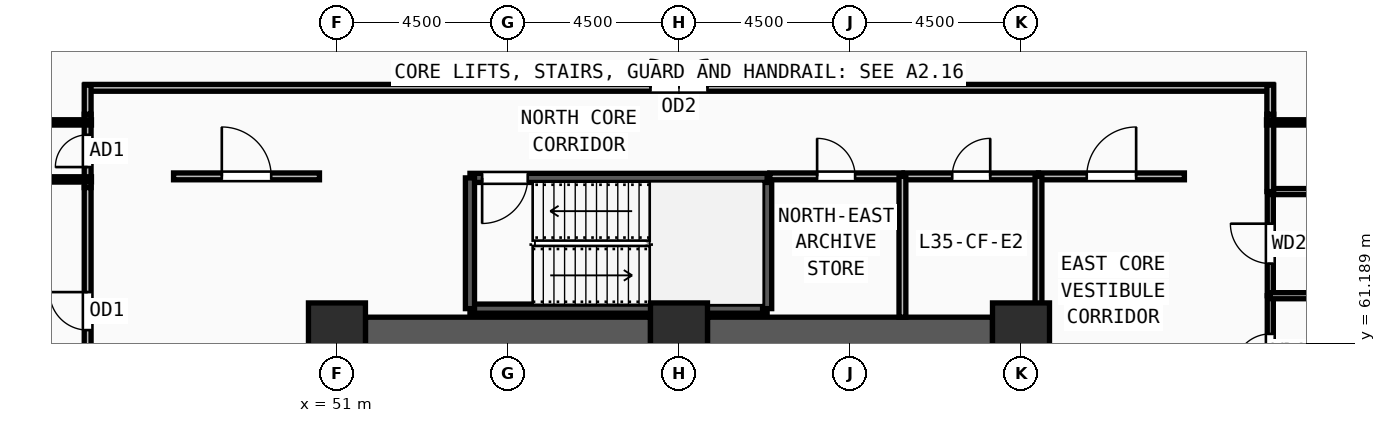
"""IFC4 building model, lengths in metres.
Left out: names, types, materials, properties, quantities, classifications, styles, units other than length and angle.
Written with IfcOpenShell. Run it as: python <this file> out.ifc"""

import sys

from ifc_helpers import new_model, si_unit, direction, frame, frame_2d, origin, origin_2d, place, context, subcontext, project, spatial, rectangle, extrude, source, transform, mapped, element, fill, save


model = new_model("IFC4")
c1 = context("Model", 3, precision=1e-05, world=origin(), true_north=direction((0.0, 1.0)))
c2 = subcontext(c1, "Body", "Model", "MODEL_VIEW")
j1 = project(units=[si_unit("LENGTHUNIT", "METRE"), si_unit("PLANEANGLEUNIT", "RADIAN")], contexts=[c1])
p1 = place(None, origin())
s1 = spatial("IfcSite", under=j1, at=p1, CompositionType="ELEMENT")
p2 = place(p1, origin())
s2 = spatial("IfcBuilding", under=s1, at=p2, CompositionType="ELEMENT")
p3 = place(p2, frame((0.0, 0.0, 135.75)))
s3 = spatial("IfcBuildingStorey", under=s2, at=p3, CompositionType="ELEMENT", Elevation=135.75)
m1 = source(origin(), c2, "Body", "SweptSolid", [
    extrude(rectangle(XDim=1.5, YDim=1.5, at=origin_2d()), origin(), (0.0, 0.0, 1.0), 3.75),
])
for number, where, z_axis, x_axis in (
    (1, (69.0, 61.5, 0.0), (0.0, 0.0, 1.0), (1.0, 0.0, 0.0)),
    (2, (60.0, 61.5, 0.0), (0.0, 0.0, 1.0), (1.0, 0.0, 0.0)),
    (3, (51.0, 61.5, 0.0), (0.0, 0.0, 1.0), (1.0, 0.0, 0.0)),
):
    element("IfcColumn", number, at=place(p3, frame(where, z_axis=z_axis, x_axis=x_axis)), inside=s3, PredefinedType="COLUMN", context=c2, shape_type="MappedRepresentation", body=[
        mapped(m1, transform((0.0, 0.0, 0.0), x_axis=(1.0, 0.0, 0.0), y_axis=(0.0, 1.0, 0.0), z_axis=(0.0, 0.0, 1.0), scale=1.0)),
    ])
for number, where, z_axis, x_axis in (
    (4, (51.75, 61.5, 0.0), (0.0, 0.0, 1.0), (1.0, 0.0, 0.0)),
    (5, (60.75, 61.5, 0.0), (0.0, 0.0, 1.0), (1.0, 0.0, 0.0)),
):
    element("IfcWall", number, at=place(p3, frame(where, z_axis=z_axis, x_axis=x_axis)), inside=s3, PredefinedType="SHEAR", context=c2, shape_type="SweptSolid", body=[
        extrude(rectangle(XDim=7.5, YDim=0.75, at=frame_2d((3.75, 0.0))), origin(), (0.0, 0.0, 1.0), 3.47),
    ])
p4 = place(p3, frame((54.5, 62.1, 0.0), z_axis=(0.0, 0.0, 1.0), x_axis=(1.0, 0.0, 0.0)))
e6 = element("IfcWall", 6, at=p4, inside=s3, PredefinedType="SOLIDWALL", context=c2, shape_type="SweptSolid", body=[
    extrude(rectangle(XDim=7.82, YDim=0.24, at=frame_2d((3.91, 0.0))), origin(), (0.0, 0.0, 1.0), 3.47),
])
p5 = place(p3, frame((62.32, 62.1, 0.0), z_axis=(0.0, 0.0, 1.0), x_axis=(0.0, 1.0, 0.0)))
e7 = element("IfcWall", 7, at=p5, inside=s3, PredefinedType="SOLIDWALL", context=c2, shape_type="SweptSolid", body=[
    extrude(rectangle(XDim=3.44, YDim=0.24, at=frame_2d((1.72, 0.0))), origin(), (0.0, 0.0, 1.0), 3.47),
])
p6 = place(p3, frame((62.32, 65.54, 0.0), z_axis=(0.0, 0.0, 1.0), x_axis=(-1.0, 0.0, 0.0)))
e8 = element("IfcWall", 8, at=p6, inside=s3, PredefinedType="SOLIDWALL", context=c2, shape_type="SweptSolid", body=[
    extrude(rectangle(XDim=7.82, YDim=0.24, at=frame_2d((3.91, 0.0))), origin(), (0.0, 0.0, 1.0), 3.47),
])
m2 = source(origin(), c2, "Body", "SweptSolid", [
    extrude(rectangle(XDim=1.2, YDim=2.2, at=frame_2d((0.6, 1.1))), frame((0.0, 0.13, 0.0), z_axis=(0.0, -1.0, 0.0), x_axis=(1.0, 0.0, 0.0)), (0.0, 0.0, 1.0), 0.26),
])
p7 = place(p6, frame((6.3, 0.0, 0.0)))
e9 = element("IfcOpeningElement", 9, at=p7, cuts=e8, PredefinedType="OPENING", context=c2, shape_type="MappedRepresentation", body=[
    mapped(m2, transform((0.0, 0.0, 0.0), x_axis=(1.0, 0.0, 0.0), y_axis=(0.0, 1.0, 0.0), z_axis=(0.0, 0.0, 1.0), scale=1.0)),
])
p8 = place(p3, frame((54.5, 65.54, 0.0), z_axis=(0.0, 0.0, 1.0), x_axis=(0.0, -1.0, 0.0)))
e10 = element("IfcWall", 10, at=p8, inside=s3, PredefinedType="SOLIDWALL", context=c2, shape_type="SweptSolid", body=[
    extrude(rectangle(XDim=3.44, YDim=0.24, at=frame_2d((1.72, 0.0))), origin(), (0.0, 0.0, 1.0), 3.47),
])
p9 = place(p3, frame((75.56, 59.48, 0.0), z_axis=(0.0, 0.0, 1.0), x_axis=(0.0, 1.0, 0.0)))
e11 = element("IfcWall", 11, at=p9, inside=s3, PredefinedType="PARTITIONING", context=c2, shape_type="SweptSolid", body=[
    extrude(rectangle(XDim=2.96, YDim=0.16, at=frame_2d((1.48, 0.0))), origin(), (0.0, 0.0, 1.0), 3.47),
])
m3 = source(origin(), c2, "Body", "SweptSolid", [
    extrude(rectangle(XDim=0.95, YDim=2.15, at=frame_2d((0.475, 1.075))), frame((0.0, 0.09, 0.0), z_axis=(0.0, -1.0, 0.0), x_axis=(1.0, 0.0, 0.0)), (0.0, 0.0, 1.0), 0.18),
])
p10 = place(p9, frame((1.005, 0.0, 0.0)))
e12 = element("IfcOpeningElement", 12, at=p10, cuts=e11, PredefinedType="OPENING", context=c2, shape_type="MappedRepresentation", body=[
    mapped(m3, transform((0.0, 0.0, 0.0), x_axis=(1.0, 0.0, 0.0), y_axis=(0.0, 1.0, 0.0), z_axis=(0.0, 0.0, 1.0), scale=1.0)),
])
p11 = place(p3, frame((75.56, 62.44, 0.0), z_axis=(0.0, 0.0, 1.0), x_axis=(0.0, 1.0, 0.0)))
e13 = element("IfcWall", 13, at=p11, inside=s3, PredefinedType="PARTITIONING", context=c2, shape_type="SweptSolid", body=[
    extrude(rectangle(XDim=2.74, YDim=0.16, at=frame_2d((1.37, 0.0))), origin(), (0.0, 0.0, 1.0), 3.47),
])
m4 = source(origin(), c2, "Body", "SweptSolid", [
    extrude(rectangle(XDim=1.05, YDim=2.15, at=frame_2d((0.525, 1.075))), frame((0.0, 0.09, 0.0), z_axis=(0.0, -1.0, 0.0), x_axis=(1.0, 0.0, 0.0)), (0.0, 0.0, 1.0), 0.18),
])
p12 = place(p11, frame((0.845, 0.0, 0.0)))
e14 = element("IfcOpeningElement", 14, at=p12, cuts=e13, PredefinedType="OPENING", context=c2, shape_type="MappedRepresentation", body=[
    mapped(m4, transform((0.0, 0.0, 0.0), x_axis=(1.0, 0.0, 0.0), y_axis=(0.0, 1.0, 0.0), z_axis=(0.0, 0.0, 1.0), scale=1.0)),
])
p13 = place(p3, frame((62.39, 65.58, 0.0), z_axis=(0.0, 0.0, 1.0), x_axis=(1.0, 0.0, 0.0)))
e15 = element("IfcWall", 15, at=p13, inside=s3, PredefinedType="PARTITIONING", context=c2, shape_type="SweptSolid", body=[
    extrude(rectangle(XDim=3.49, YDim=0.18, at=frame_2d((1.745, 0.0))), origin(), (0.0, 0.0, 1.0), 3.47),
])
m5 = source(origin(), c2, "Body", "SweptSolid", [
    extrude(rectangle(XDim=1.0, YDim=2.2, at=frame_2d((0.5, 1.1))), frame((0.0, 0.1, 0.0), z_axis=(0.0, -1.0, 0.0), x_axis=(1.0, 0.0, 0.0)), (0.0, 0.0, 1.0), 0.2),
])
p14 = place(p13, frame((1.245, 0.0, 0.0)))
e16 = element("IfcOpeningElement", 16, at=p14, cuts=e15, PredefinedType="OPENING", context=c2, shape_type="MappedRepresentation", body=[
    mapped(m5, transform((0.0, 0.0, 0.0), x_axis=(1.0, 0.0, 0.0), y_axis=(0.0, 1.0, 0.0), z_axis=(0.0, 0.0, 1.0), scale=1.0)),
])
p15 = place(p3, frame((65.92, 65.58, 0.0), z_axis=(0.0, 0.0, 1.0), x_axis=(1.0, 0.0, 0.0)))
e17 = element("IfcWall", 17, at=p15, inside=s3, PredefinedType="PARTITIONING", context=c2, shape_type="SweptSolid", body=[
    extrude(rectangle(XDim=3.54, YDim=0.18, at=frame_2d((1.77, 0.0))), origin(), (0.0, 0.0, 1.0), 3.47),
])
p16 = place(p15, frame((1.27, 0.0, 0.0)))
e18 = element("IfcOpeningElement", 18, at=p16, cuts=e17, PredefinedType="OPENING", context=c2, shape_type="MappedRepresentation", body=[
    mapped(m5, transform((0.0, 0.0, 0.0), x_axis=(1.0, 0.0, 0.0), y_axis=(0.0, 1.0, 0.0), z_axis=(0.0, 0.0, 1.0), scale=1.0)),
])
p17 = place(p3, frame((46.7, 65.58, 0.0), z_axis=(0.0, 0.0, 1.0), x_axis=(1.0, 0.0, 0.0)))
e19 = element("IfcWall", 19, at=p17, inside=s3, PredefinedType="PARTITIONING", context=c2, shape_type="SweptSolid", body=[
    extrude(rectangle(XDim=3.84, YDim=0.18, at=frame_2d((1.92, 0.0))), origin(), (0.0, 0.0, 1.0), 3.47),
])
m6 = source(origin(), c2, "Body", "SweptSolid", [
    extrude(rectangle(XDim=1.3, YDim=2.2, at=frame_2d((0.65, 1.1))), frame((0.0, 0.1, 0.0), z_axis=(0.0, -1.0, 0.0), x_axis=(1.0, 0.0, 0.0)), (0.0, 0.0, 1.0), 0.2),
])
p18 = place(p17, frame((1.27, 0.0, 0.0)))
e20 = element("IfcOpeningElement", 20, at=p18, cuts=e19, PredefinedType="OPENING", context=c2, shape_type="MappedRepresentation", body=[
    mapped(m6, transform((0.0, 0.0, 0.0), x_axis=(1.0, 0.0, 0.0), y_axis=(0.0, 1.0, 0.0), z_axis=(0.0, 0.0, 1.0), scale=1.0)),
])
p19 = place(p3, frame((69.46, 65.58, 0.0), z_axis=(0.0, 0.0, 1.0), x_axis=(1.0, 0.0, 0.0)))
e21 = element("IfcWall", 21, at=p19, inside=s3, PredefinedType="PARTITIONING", context=c2, shape_type="SweptSolid", body=[
    extrude(rectangle(XDim=3.84, YDim=0.18, at=frame_2d((1.92, 0.0))), origin(), (0.0, 0.0, 1.0), 3.47),
])
p20 = place(p19, frame((1.27, 0.0, 0.0)))
e22 = element("IfcOpeningElement", 22, at=p20, cuts=e21, PredefinedType="OPENING", context=c2, shape_type="MappedRepresentation", body=[
    mapped(m6, transform((0.0, 0.0, 0.0), x_axis=(1.0, 0.0, 0.0), y_axis=(0.0, 1.0, 0.0), z_axis=(0.0, 0.0, 1.0), scale=1.0)),
])
p21 = place(p3, frame((44.37, 67.91, 0.0), z_axis=(0.0, 0.0, 1.0), x_axis=(1.0, 0.0, 0.0)))
e23 = element("IfcWall", 23, at=p21, inside=s3, PredefinedType="PARTITIONING", context=c2, shape_type="SweptSolid", body=[
    extrude(rectangle(XDim=31.26, YDim=0.18, at=frame_2d((15.63, 0.0))), origin(), (0.0, 0.0, 1.0), 3.47),
])
m7 = source(origin(), c2, "Body", "SweptSolid", [
    extrude(rectangle(XDim=1.5, YDim=2.2, at=frame_2d((0.75, 1.1))), frame((0.0, 0.1, 0.0), z_axis=(0.0, -1.0, 0.0), x_axis=(1.0, 0.0, 0.0)), (0.0, 0.0, 1.0), 0.2),
])
p22 = place(p21, frame((14.88, 0.0, 0.0)))
e24 = element("IfcOpeningElement", 24, at=p22, cuts=e23, PredefinedType="OPENING", context=c2, shape_type="MappedRepresentation", body=[
    mapped(m7, transform((0.0, 0.0, 0.0), x_axis=(1.0, 0.0, 0.0), y_axis=(0.0, 1.0, 0.0), z_axis=(0.0, 0.0, 1.0), scale=1.0)),
])
p23 = place(p3, frame((44.44, 65.285, 0.0), z_axis=(0.0, 0.0, 1.0), x_axis=(0.0, 1.0, 0.0)))
e25 = element("IfcWall", 25, at=p23, inside=s3, PredefinedType="PARTITIONING", context=c2, shape_type="SweptSolid", body=[
    extrude(rectangle(XDim=1.93, YDim=0.18, at=frame_2d((0.965, 0.0))), origin(), (0.0, 0.0, 1.0), 3.47),
])
m8 = source(origin(), c2, "Body", "SweptSolid", [
    extrude(rectangle(XDim=0.85, YDim=2.1, at=frame_2d((0.425, 1.05))), frame((0.0, 0.1, 0.0), z_axis=(0.0, -1.0, 0.0), x_axis=(1.0, 0.0, 0.0)), (0.0, 0.0, 1.0), 0.2),
])
p24 = place(p23, frame((0.54, 0.0, 0.0)))
e26 = element("IfcOpeningElement", 26, at=p24, cuts=e25, PredefinedType="OPENING", context=c2, shape_type="MappedRepresentation", body=[
    mapped(m8, transform((0.0, 0.0, 0.0), x_axis=(1.0, 0.0, 0.0), y_axis=(0.0, 1.0, 0.0), z_axis=(0.0, 0.0, 1.0), scale=1.0)),
])
p25 = place(p3, frame((44.44, 58.785, 0.0), z_axis=(0.0, 0.0, 1.0), x_axis=(0.0, 1.0, 0.0)))
e27 = element("IfcWall", 27, at=p25, inside=s3, PredefinedType="PARTITIONING", context=c2, shape_type="SweptSolid", body=[
    extrude(rectangle(XDim=6.5, YDim=0.18, at=frame_2d((3.25, 0.0))), origin(), (0.0, 0.0, 1.0), 3.47),
])
p26 = place(p25, frame((2.75, 0.0, 0.0)))
e28 = element("IfcOpeningElement", 28, at=p26, cuts=e27, PredefinedType="OPENING", context=c2, shape_type="MappedRepresentation", body=[
    mapped(m5, transform((0.0, 0.0, 0.0), x_axis=(1.0, 0.0, 0.0), y_axis=(0.0, 1.0, 0.0), z_axis=(0.0, 0.0, 1.0), scale=1.0)),
])
for number, where, z_axis, x_axis in (
    (29, (75.56, 62.44, 0.0), (0.0, 0.0, 1.0), (1.0, 0.0, 0.0)),
    (30, (75.56, 65.18, 0.0), (0.0, 0.0, 1.0), (1.0, 0.0, 0.0)),
):
    element("IfcWall", number, at=place(p3, frame(where, z_axis=z_axis, x_axis=x_axis)), inside=s3, PredefinedType="PARTITIONING", context=c2, shape_type="SweptSolid", body=[
        extrude(rectangle(XDim=4.46, YDim=0.16, at=frame_2d((2.23, 0.0))), origin(), (0.0, 0.0, 1.0), 3.47),
    ])
p27 = place(p3, frame((65.88, 61.875, 0.0), z_axis=(0.0, 0.0, 1.0), x_axis=(0.0, 1.0, 0.0)))
e31 = element("IfcWall", 31, at=p27, inside=s3, PredefinedType="PARTITIONING", context=c2, shape_type="SweptSolid", body=[
    extrude(rectangle(XDim=3.705, YDim=0.18, at=frame_2d((1.853, 0.0))), origin(), (0.0, 0.0, 1.0), 3.47),
])
p28 = place(p3, frame((69.46, 61.95, 0.0), z_axis=(0.0, 0.0, 1.0), x_axis=(0.0, 1.0, 0.0)))
e32 = element("IfcWall", 32, at=p28, inside=s3, PredefinedType="PARTITIONING", context=c2, shape_type="SweptSolid", body=[
    extrude(rectangle(XDim=3.63, YDim=0.18, at=frame_2d((1.815, 0.0))), origin(), (0.0, 0.0, 1.0), 3.47),
])
p29 = place(p3, frame((75.56, 67.215, 0.0), z_axis=(0.0, 0.0, 1.0), x_axis=(0.0, -1.0, 0.0)))
e33 = element("IfcWall", 33, at=p29, inside=s3, PredefinedType="PARTITIONING", context=c2, shape_type="SweptSolid", body=[
    extrude(rectangle(XDim=2.035, YDim=0.18, at=frame_2d((1.018, 0.0))), origin(), (0.0, 0.0, 1.0), 3.47),
])
for number, where, z_axis, x_axis in (
    (34, (44.44, 67.215, 0.0), (0.0, 0.0, 1.0), (0.0, 1.0, 0.0)),
    (35, (75.56, 67.98, 0.0), (0.0, 0.0, 1.0), (0.0, -1.0, 0.0)),
):
    element("IfcWall", number, at=place(p3, frame(where, z_axis=z_axis, x_axis=x_axis)), inside=s3, PredefinedType="PARTITIONING", context=c2, shape_type="SweptSolid", body=[
        extrude(rectangle(XDim=0.765, YDim=0.18, at=frame_2d((0.382, 0.0))), origin(), (0.0, 0.0, 1.0), 3.47),
    ])
p30 = place(p3, frame((44.54, 65.5, 0.0), z_axis=(0.0, 0.0, 1.0), x_axis=(-1.0, 0.0, 0.0)))
e36 = element("IfcWall", 36, at=p30, inside=s3, PredefinedType="PARTITIONING", context=c2, shape_type="SweptSolid", body=[
    extrude(rectangle(XDim=19.867, YDim=0.14, at=frame_2d((9.934, 0.0))), origin(), (0.0, 0.0, 1.0), 2.655),
])
p31 = place(p3, frame((44.54, 67.0, 0.0), z_axis=(0.0, 0.0, 1.0), x_axis=(-1.0, 0.0, 0.0)))
e37 = element("IfcWall", 37, at=p31, inside=s3, PredefinedType="PARTITIONING", context=c2, shape_type="SweptSolid", body=[
    extrude(rectangle(XDim=20.619, YDim=0.14, at=frame_2d((10.31, 0.0))), origin(), (0.0, 0.0, 1.0), 2.655),
])
p32 = place(p3, frame((75.46, 67.0, 0.0), z_axis=(0.0, 0.0, 1.0), x_axis=(1.0, 0.0, 0.0)))
e38 = element("IfcWall", 38, at=p32, inside=s3, PredefinedType="PARTITIONING", context=c2, shape_type="SweptSolid", body=[
    extrude(rectangle(XDim=20.635, YDim=0.14, at=frame_2d((10.317, 0.0))), origin(), (0.0, 0.0, 1.0), 2.655),
])
m9 = source(origin(), c2, "Body", "SweptSolid", [
    extrude(rectangle(XDim=1.2, YDim=2.2, at=frame_2d((0.6, 1.1))), frame((0.0, 0.025, 0.0), z_axis=(0.0, -1.0, 0.0), x_axis=(1.0, 0.0, 0.0)), (0.0, 0.0, 1.0), 0.05),
])
p33 = place(p7, origin())
e39 = element("IfcDoor", 39, at=p33, inside=s3, OperationType="SINGLE_SWING_RIGHT", PredefinedType="DOOR", context=c2, shape_type="MappedRepresentation", body=[
    mapped(m9, transform((0.0, 0.0, 0.0), x_axis=(1.0, 0.0, 0.0), y_axis=(0.0, 1.0, 0.0), z_axis=(0.0, 0.0, 1.0), scale=1.0)),
])
fill(e9, e39)
m10 = source(origin(), c2, "Body", "SweptSolid", [
    extrude(rectangle(XDim=0.95, YDim=2.15, at=frame_2d((0.475, 1.075))), frame((0.0, 0.025, 0.0), z_axis=(0.0, -1.0, 0.0), x_axis=(1.0, 0.0, 0.0)), (0.0, 0.0, 1.0), 0.05),
])
p34 = place(p10, origin())
e40 = element("IfcDoor", 40, at=p34, inside=s3, OperationType="SINGLE_SWING_LEFT", PredefinedType="DOOR", context=c2, shape_type="MappedRepresentation", body=[
    mapped(m10, transform((0.0, 0.0, 0.0), x_axis=(1.0, 0.0, 0.0), y_axis=(0.0, 1.0, 0.0), z_axis=(0.0, 0.0, 1.0), scale=1.0)),
])
fill(e12, e40)
m11 = source(origin(), c2, "Body", "SweptSolid", [
    extrude(rectangle(XDim=1.05, YDim=2.15, at=frame_2d((0.525, 1.075))), frame((0.0, 0.025, 0.0), z_axis=(0.0, -1.0, 0.0), x_axis=(1.0, 0.0, 0.0)), (0.0, 0.0, 1.0), 0.05),
])
p35 = place(p12, origin())
e41 = element("IfcDoor", 41, at=p35, inside=s3, OperationType="SINGLE_SWING_RIGHT", PredefinedType="DOOR", context=c2, shape_type="MappedRepresentation", body=[
    mapped(m11, transform((0.0, 0.0, 0.0), x_axis=(1.0, 0.0, 0.0), y_axis=(0.0, 1.0, 0.0), z_axis=(0.0, 0.0, 1.0), scale=1.0)),
])
fill(e14, e41)
m12 = source(origin(), c2, "Body", "SweptSolid", [
    extrude(rectangle(XDim=1.0, YDim=2.2, at=frame_2d((0.5, 1.1))), frame((0.0, 0.025, 0.0), z_axis=(0.0, -1.0, 0.0), x_axis=(1.0, 0.0, 0.0)), (0.0, 0.0, 1.0), 0.05),
])
p36 = place(p14, origin())
e42 = element("IfcDoor", 42, at=p36, inside=s3, OperationType="SINGLE_SWING_LEFT", PredefinedType="DOOR", context=c2, shape_type="MappedRepresentation", body=[
    mapped(m12, transform((0.0, 0.0, 0.0), x_axis=(1.0, 0.0, 0.0), y_axis=(0.0, 1.0, 0.0), z_axis=(0.0, 0.0, 1.0), scale=1.0)),
])
fill(e16, e42)
p37 = place(p16, origin())
e43 = element("IfcDoor", 43, at=p37, inside=s3, OperationType="SINGLE_SWING_RIGHT", PredefinedType="DOOR", context=c2, shape_type="MappedRepresentation", body=[
    mapped(m12, transform((0.0, 0.0, 0.0), x_axis=(1.0, 0.0, 0.0), y_axis=(0.0, 1.0, 0.0), z_axis=(0.0, 0.0, 1.0), scale=1.0)),
])
fill(e18, e43)
m13 = source(origin(), c2, "Body", "SweptSolid", [
    extrude(rectangle(XDim=1.3, YDim=2.2, at=frame_2d((0.65, 1.1))), frame((0.0, 0.025, 0.0), z_axis=(0.0, -1.0, 0.0), x_axis=(1.0, 0.0, 0.0)), (0.0, 0.0, 1.0), 0.05),
])
p38 = place(p18, origin())
e44 = element("IfcDoor", 44, at=p38, inside=s3, OperationType="SINGLE_SWING_LEFT", PredefinedType="DOOR", context=c2, shape_type="MappedRepresentation", body=[
    mapped(m13, transform((0.0, 0.0, 0.0), x_axis=(1.0, 0.0, 0.0), y_axis=(0.0, 1.0, 0.0), z_axis=(0.0, 0.0, 1.0), scale=1.0)),
])
fill(e20, e44)
p39 = place(p20, origin())
e45 = element("IfcDoor", 45, at=p39, inside=s3, OperationType="SINGLE_SWING_RIGHT", PredefinedType="DOOR", context=c2, shape_type="MappedRepresentation", body=[
    mapped(m13, transform((0.0, 0.0, 0.0), x_axis=(1.0, 0.0, 0.0), y_axis=(0.0, 1.0, 0.0), z_axis=(0.0, 0.0, 1.0), scale=1.0)),
])
fill(e22, e45)
m14 = source(origin(), c2, "Body", "SweptSolid", [
    extrude(rectangle(XDim=1.5, YDim=2.2, at=frame_2d((0.75, 1.1))), frame((0.0, 0.025, 0.0), z_axis=(0.0, -1.0, 0.0), x_axis=(1.0, 0.0, 0.0)), (0.0, 0.0, 1.0), 0.05),
])
p40 = place(p22, origin())
e46 = element("IfcDoor", 46, at=p40, inside=s3, OperationType="DOUBLE_DOOR_SINGLE_SWING", PredefinedType="DOOR", context=c2, shape_type="MappedRepresentation", body=[
    mapped(m14, transform((0.0, 0.0, 0.0), x_axis=(1.0, 0.0, 0.0), y_axis=(0.0, 1.0, 0.0), z_axis=(0.0, 0.0, 1.0), scale=1.0)),
])
fill(e24, e46)
m15 = source(origin(), c2, "Body", "SweptSolid", [
    extrude(rectangle(XDim=0.85, YDim=2.1, at=frame_2d((0.425, 1.05))), frame((0.0, 0.025, 0.0), z_axis=(0.0, -1.0, 0.0), x_axis=(1.0, 0.0, 0.0)), (0.0, 0.0, 1.0), 0.05),
])
p41 = place(p24, origin())
e47 = element("IfcDoor", 47, at=p41, inside=s3, OperationType="SINGLE_SWING_LEFT", PredefinedType="DOOR", context=c2, shape_type="MappedRepresentation", body=[
    mapped(m15, transform((0.0, 0.0, 0.0), x_axis=(1.0, 0.0, 0.0), y_axis=(0.0, 1.0, 0.0), z_axis=(0.0, 0.0, 1.0), scale=1.0)),
])
fill(e26, e47)
p42 = place(p26, origin())
e48 = element("IfcDoor", 48, at=p42, inside=s3, OperationType="SINGLE_SWING_RIGHT", PredefinedType="DOOR", context=c2, shape_type="MappedRepresentation", body=[
    mapped(m12, transform((0.0, 0.0, 0.0), x_axis=(1.0, 0.0, 0.0), y_axis=(0.0, 1.0, 0.0), z_axis=(0.0, 0.0, 1.0), scale=1.0)),
])
fill(e28, e48)
save(model, sys.argv[1])
